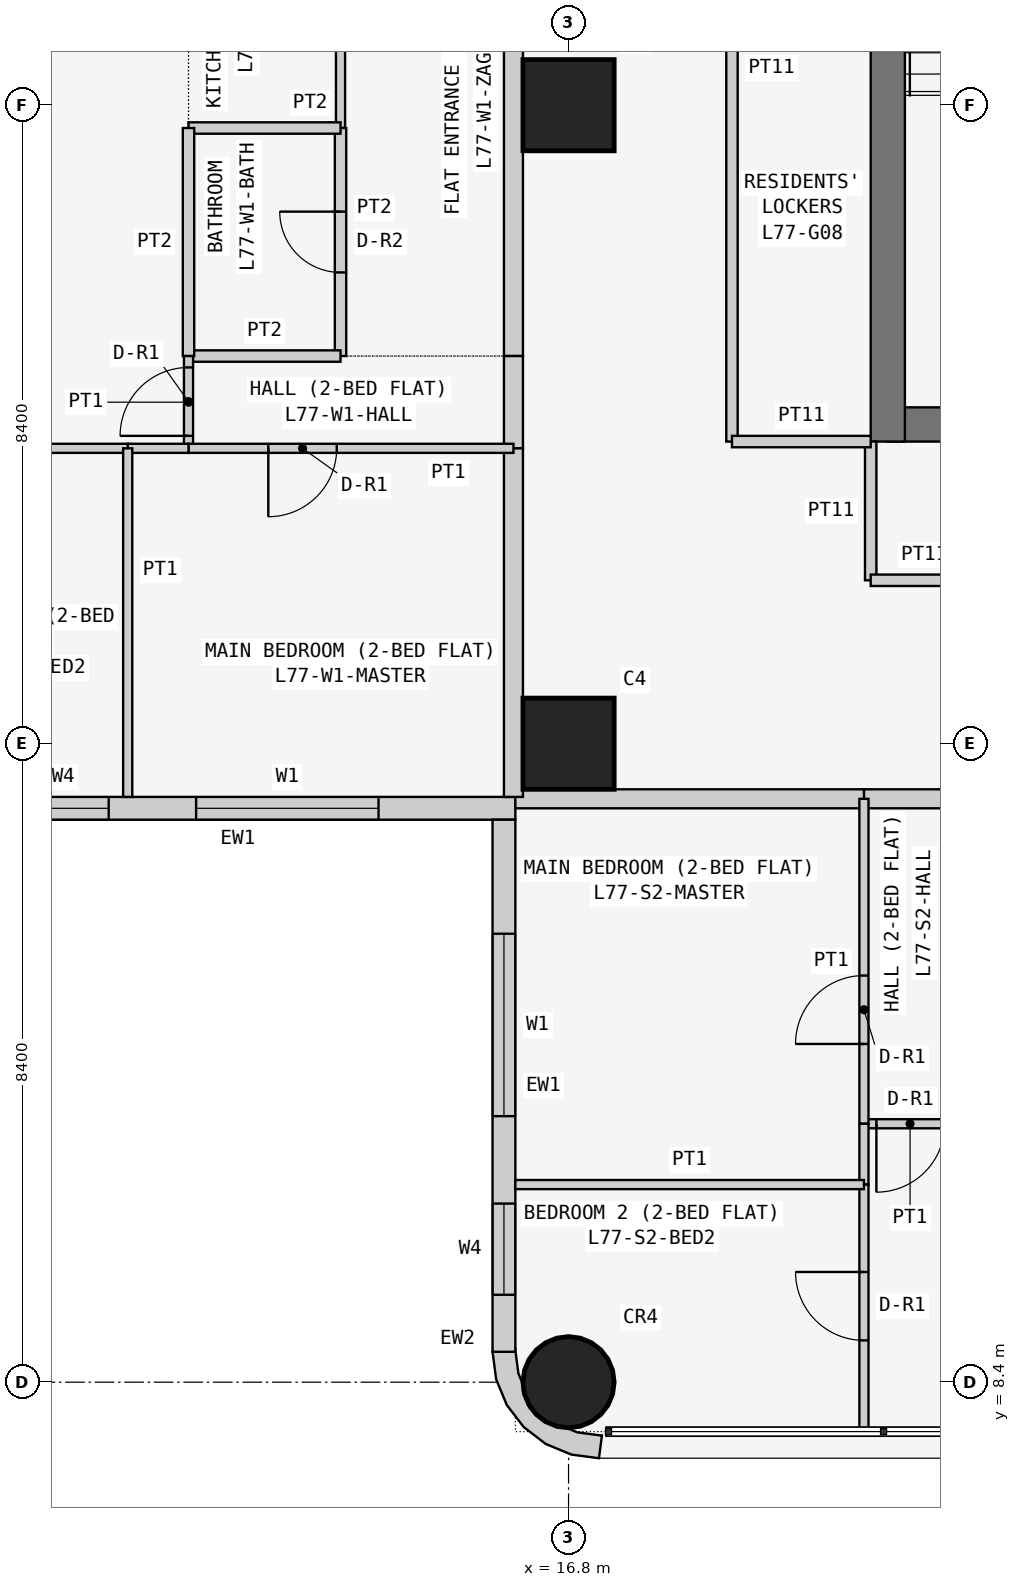
"""IFC4 building model, lengths in metres.
Left out: names, types, materials, properties, quantities, classifications, styles, units other than length and angle.
Written with IfcOpenShell. Run it as: python <this file> out.ifc"""

import sys

from ifc_helpers import new_model, si_unit, direction, frame, frame_2d, origin, origin_2d, place, context, subcontext, project, spatial, polyline, rectangle, circle, outline, extrude, element, fill, save


model = new_model("IFC4")
c1 = context("Model", 3, precision=1e-05, world=origin(), true_north=direction((0.0, 1.0)))
c2 = subcontext(c1, "Body", "Model", "MODEL_VIEW")
j1 = project(units=[si_unit("LENGTHUNIT", "METRE"), si_unit("PLANEANGLEUNIT", "RADIAN")], contexts=[c1])
p1 = place(None, origin())
s1 = spatial("IfcSite", under=j1, at=p1, CompositionType="ELEMENT")
p2 = place(p1, origin())
s2 = spatial("IfcBuilding", under=s1, at=p2, CompositionType="ELEMENT")
p3 = place(p2, frame((0.0, 0.0, 293.7)))
s3 = spatial("IfcBuildingStorey", under=s2, at=p3, CompositionType="ELEMENT", Elevation=293.7)
p4 = place(p3, frame((16.8, 8.4, 0.0), z_axis=(0.0, 0.0, 1.0), x_axis=(1.0, 0.0, 0.0)))
e1 = element("IfcColumn", 1, at=p4, inside=s3, PredefinedType="COLUMN", context=c2, shape_type="SweptSolid", body=[
    extrude(circle(Radius=0.6, at=origin_2d()), origin(), (0.0, 0.0, 1.0), 3.6),
])
for number, where, z_axis, x_axis in (
    (2, (16.8, 16.8, 0.0), (0.0, 0.0, 1.0), (1.0, 0.0, 0.0)),
    (3, (16.8, 25.2, 0.0), (0.0, 0.0, 1.0), (1.0, 0.0, 0.0)),
):
    element("IfcColumn", number, at=place(p3, frame(where, z_axis=z_axis, x_axis=x_axis)), inside=s3, PredefinedType="COLUMN", context=c2, shape_type="SweptSolid", body=[
        extrude(rectangle(XDim=1.2, YDim=1.2, at=origin_2d()), origin(), (0.0, 0.0, 1.0), 3.6),
    ])
p5 = place(p3, frame((21.0, 21.0, 0.0), z_axis=(0.0, 0.0, 1.0), x_axis=(1.0, 0.0, 0.0)))
e4 = element("IfcWall", 4, at=p5, inside=s3, PredefinedType="SHEAR", context=c2, shape_type="SweptSolid", body=[
    extrude(rectangle(XDim=17.025, YDim=0.45, at=frame_2d((8.512, 0.0))), origin(), (0.0, 0.0, 1.0), 3.6),
])
p6 = place(p3, frame((21.0, 37.8, 0.0), z_axis=(0.0, 0.0, 1.0), x_axis=(0.0, -1.0, 0.0)))
e5 = element("IfcWall", 5, at=p6, inside=s3, PredefinedType="SHEAR", context=c2, shape_type="SweptSolid", body=[
    extrude(rectangle(XDim=17.025, YDim=0.45, at=frame_2d((8.513, 0.0))), origin(), (0.0, 0.0, 1.0), 3.6),
])
p7 = place(p6, frame((5.4, 0.0, 0.0)))
e6 = element("IfcOpeningElement", 6, at=p7, cuts=e5, PredefinedType="OPENING", context=c2, shape_type="SweptSolid", body=[
    extrude(rectangle(XDim=1.2, YDim=2.1, at=frame_2d((0.6, 1.05))), frame((0.0, 0.235, 0.0), z_axis=(0.0, -1.0, 0.0), x_axis=(1.0, 0.0, 0.0)), (0.0, 0.0, 1.0), 0.47),
])
p8 = place(p3, frame((8.8, 15.95, 0.0), z_axis=(0.0, 0.0, 1.0), x_axis=(1.0, 0.0, 0.0)))
e7 = element("IfcWall", 7, at=p8, inside=s3, PredefinedType="SOLIDWALL", context=c2, shape_type="SweptSolid", body=[
    extrude(rectangle(XDim=7.3, YDim=0.3, at=frame_2d((3.65, 0.0))), origin(), (0.0, 0.0, 1.0), 3.45),
])
p9 = place(p8, frame((3.1, 0.0, 0.9)))
e8 = element("IfcOpeningElement", 8, at=p9, cuts=e7, PredefinedType="OPENING", context=c2, shape_type="SweptSolid", body=[
    extrude(rectangle(XDim=2.4, YDim=1.5, at=frame_2d((1.2, 0.75))), frame((0.0, 0.16, 0.0), z_axis=(0.0, -1.0, 0.0), x_axis=(1.0, 0.0, 0.0)), (0.0, 0.0, 1.0), 0.32),
])
p10 = place(p8, frame((0.75, 0.0, 0.9)))
e9 = element("IfcOpeningElement", 9, at=p10, cuts=e7, PredefinedType="OPENING", context=c2, shape_type="SweptSolid", body=[
    extrude(rectangle(XDim=1.2, YDim=1.5, at=frame_2d((0.6, 0.75))), frame((0.0, 0.16, 0.0), z_axis=(0.0, -1.0, 0.0), x_axis=(1.0, 0.0, 0.0)), (0.0, 0.0, 1.0), 0.32),
])
p11 = place(p3, frame((15.95, 15.8, 0.0), z_axis=(0.0, 0.0, 1.0), x_axis=(0.0, -1.0, 0.0)))
e10 = element("IfcWall", 10, at=p11, inside=s3, PredefinedType="SOLIDWALL", context=c2, shape_type="SweptSolid", body=[
    extrude(rectangle(XDim=7.0, YDim=0.3, at=frame_2d((3.5, 0.0))), origin(), (0.0, 0.0, 1.0), 3.45),
])
p12 = place(p11, frame((1.5, 0.0, 0.9)))
e11 = element("IfcOpeningElement", 11, at=p12, cuts=e10, PredefinedType="OPENING", context=c2, shape_type="SweptSolid", body=[
    extrude(rectangle(XDim=2.4, YDim=1.5, at=frame_2d((1.2, 0.75))), frame((0.0, 0.16, 0.0), z_axis=(0.0, -1.0, 0.0), x_axis=(1.0, 0.0, 0.0)), (0.0, 0.0, 1.0), 0.32),
])
p13 = place(p11, frame((5.05, 0.0, 0.9)))
e12 = element("IfcOpeningElement", 12, at=p13, cuts=e10, PredefinedType="OPENING", context=c2, shape_type="SweptSolid", body=[
    extrude(rectangle(XDim=1.2, YDim=1.5, at=frame_2d((0.6, 0.75))), frame((0.0, 0.16, 0.0), z_axis=(0.0, -1.0, 0.0), x_axis=(1.0, 0.0, 0.0)), (0.0, 0.0, 1.0), 0.32),
])
p14 = place(p3, frame((16.224, 8.762, 0.0), z_axis=(0.0, 0.0, 1.0), x_axis=(-0.707106781187, -0.707106781187, 0.0)))
e13 = element("IfcWall", 13, at=p14, inside=s3, PredefinedType="SOLIDWALL", context=c2, shape_type="SweptSolid", body=[
    extrude(outline(polyline([(0.033, 1.469), (0.047, 1.455), (0.233, 1.212), (0.292, 1.069), (0.358, 1.003), (0.449, 0.783), (0.449, 0.543), (0.358, 0.322), (0.292, 0.257), (0.233, 0.114), (0.047, -0.129), (0.033, -0.143), (0.273, -0.327), (0.495, -0.037), (0.635, 0.3), (0.683, 0.663), (0.635, 1.025), (0.495, 1.363), (0.273, 1.653), (0.033, 1.469)])), origin(), (0.0, 0.0, 1.0), 3.45),
])
p15 = place(p3, frame((20.775, 20.775, 0.0), z_axis=(0.0, 0.0, 1.0), x_axis=(0.0, -1.0, 0.0)))
e14 = element("IfcWall", 14, at=p15, inside=s3, PredefinedType="PARTITIONING", context=c2, shape_type="SweptSolid", body=[
    extrude(rectangle(XDim=1.825, YDim=0.15, at=frame_2d((0.913, 0.0))), origin(), (0.0, 0.0, 1.0), 3.45),
])
p16 = place(p3, frame((20.775, 18.95, 0.0), z_axis=(0.0, 0.0, 1.0), x_axis=(1.0, 0.0, 0.0)))
e15 = element("IfcWall", 15, at=p16, inside=s3, PredefinedType="PARTITIONING", context=c2, shape_type="SweptSolid", body=[
    extrude(rectangle(XDim=3.525, YDim=0.15, at=frame_2d((1.763, 0.0))), origin(), (0.0, 0.0, 1.0), 3.45),
])
p17 = place(p16, frame((1.262, 0.0, 0.0)))
e16 = element("IfcOpeningElement", 16, at=p17, cuts=e15, PredefinedType="OPENING", context=c2, shape_type="SweptSolid", body=[
    extrude(rectangle(XDim=1.0, YDim=2.1, at=frame_2d((0.5, 1.05))), frame((0.0, 0.085, 0.0), z_axis=(0.0, -1.0, 0.0), x_axis=(1.0, 0.0, 0.0)), (0.0, 0.0, 1.0), 0.17),
])
p18 = place(p3, frame((18.95, 30.6, 0.0), z_axis=(0.0, 0.0, 1.0), x_axis=(0.0, -1.0, 0.0)))
e17 = element("IfcWall", 17, at=p18, inside=s3, PredefinedType="PARTITIONING", context=c2, shape_type="SweptSolid", body=[
    extrude(rectangle(XDim=9.825, YDim=0.15, at=frame_2d((4.913, 0.0))), origin(), (0.0, 0.0, 1.0), 3.45),
])
p19 = place(p18, frame((1.75, 0.0, 0.0)))
e18 = element("IfcOpeningElement", 18, at=p19, cuts=e17, PredefinedType="OPENING", context=c2, shape_type="SweptSolid", body=[
    extrude(rectangle(XDim=1.0, YDim=2.1, at=frame_2d((0.5, 1.05))), frame((0.0, 0.085, 0.0), z_axis=(0.0, -1.0, 0.0), x_axis=(1.0, 0.0, 0.0)), (0.0, 0.0, 1.0), 0.17),
])
p20 = place(p3, frame((18.95, 20.775, 0.0), z_axis=(0.0, 0.0, 1.0), x_axis=(1.0, 0.0, 0.0)))
e19 = element("IfcWall", 19, at=p20, inside=s3, PredefinedType="PARTITIONING", context=c2, shape_type="SweptSolid", body=[
    extrude(rectangle(XDim=1.825, YDim=0.15, at=frame_2d((0.913, 0.0))), origin(), (0.0, 0.0, 1.0), 3.45),
])
p21 = place(p3, frame((21.9, 16.075, 0.0), z_axis=(0.0, 0.0, 1.0), x_axis=(-1.0, 0.0, 0.0)))
e20 = element("IfcWall", 20, at=p21, inside=s3, PredefinedType="PARTITIONING", context=c2, shape_type="SweptSolid", body=[
    extrude(rectangle(XDim=1.214, YDim=0.25, at=frame_2d((0.607, 0.0))), origin(), (0.0, 0.0, 1.0), 3.45),
])
p22 = place(p3, frame((20.686, 16.075, 0.0), z_axis=(0.0, 0.0, 1.0), x_axis=(-1.0, 0.0, 0.0)))
e21 = element("IfcWall", 21, at=p22, inside=s3, PredefinedType="PARTITIONING", context=c2, shape_type="SweptSolid", body=[
    extrude(rectangle(XDim=4.586, YDim=0.25, at=frame_2d((2.293, 0.0))), origin(), (0.0, 0.0, 1.0), 3.45),
])
p23 = place(p3, frame((16.075, 21.9, 0.0), z_axis=(0.0, 0.0, 1.0), x_axis=(0.0, 1.0, 0.0)))
e22 = element("IfcWall", 22, at=p23, inside=s3, PredefinedType="PARTITIONING", context=c2, shape_type="SweptSolid", body=[
    extrude(rectangle(XDim=7.5, YDim=0.25, at=frame_2d((3.75, 0.0))), origin(), (0.0, 0.0, 1.0), 3.45),
])
p24 = place(p23, frame((5.7, 0.0, 0.0)))
e23 = element("IfcOpeningElement", 23, at=p24, cuts=e22, PredefinedType="OPENING", context=c2, shape_type="SweptSolid", body=[
    extrude(rectangle(XDim=1.0, YDim=2.1, at=frame_2d((0.5, 1.05))), frame((0.0, 0.135, 0.0), z_axis=(0.0, -1.0, 0.0), x_axis=(1.0, 0.0, 0.0)), (0.0, 0.0, 1.0), 0.27),
])
p25 = place(p3, frame((16.075, 20.686, 0.0), z_axis=(0.0, 0.0, 1.0), x_axis=(0.0, 1.0, 0.0)))
e24 = element("IfcWall", 24, at=p25, inside=s3, PredefinedType="PARTITIONING", context=c2, shape_type="SweptSolid", body=[
    extrude(rectangle(XDim=1.214, YDim=0.25, at=frame_2d((0.607, 0.0))), origin(), (0.0, 0.0, 1.0), 3.45),
])
p26 = place(p3, frame((16.075, 16.1, 0.0), z_axis=(0.0, 0.0, 1.0), x_axis=(0.0, 1.0, 0.0)))
e25 = element("IfcWall", 25, at=p26, inside=s3, PredefinedType="PARTITIONING", context=c2, shape_type="SweptSolid", body=[
    extrude(rectangle(XDim=4.586, YDim=0.25, at=frame_2d((2.293, 0.0))), origin(), (0.0, 0.0, 1.0), 3.45),
])
p27 = place(p3, frame((21.9, 11.8, 0.0), z_axis=(0.0, 0.0, 1.0), x_axis=(-1.0, 0.0, 0.0)))
e26 = element("IfcWall", 26, at=p27, inside=s3, PredefinedType="PARTITIONING", context=c2, shape_type="SweptSolid", body=[
    extrude(rectangle(XDim=1.214, YDim=0.12, at=frame_2d((0.607, 0.0))), origin(), (0.0, 0.0, 1.0), 3.45),
])
p28 = place(p27, frame((0.15, 0.0, 0.0)))
e27 = element("IfcOpeningElement", 27, at=p28, cuts=e26, PredefinedType="OPENING", context=c2, shape_type="SweptSolid", body=[
    extrude(rectangle(XDim=0.9, YDim=2.1, at=frame_2d((0.45, 1.05))), frame((0.0, 0.07, 0.0), z_axis=(0.0, -1.0, 0.0), x_axis=(1.0, 0.0, 0.0)), (0.0, 0.0, 1.0), 0.14),
])
p29 = place(p3, frame((20.686, 11.8, 0.0), z_axis=(0.0, 0.0, 1.0), x_axis=(0.0, 1.0, 0.0)))
e28 = element("IfcWall", 28, at=p29, inside=s3, PredefinedType="PARTITIONING", context=c2, shape_type="SweptSolid", body=[
    extrude(rectangle(XDim=4.275, YDim=0.12, at=frame_2d((2.137, 0.0))), origin(), (0.0, 0.0, 1.0), 3.45),
])
p30 = place(p29, frame((1.05, 0.0, 0.0)))
e29 = element("IfcOpeningElement", 29, at=p30, cuts=e28, PredefinedType="OPENING", context=c2, shape_type="SweptSolid", body=[
    extrude(rectangle(XDim=0.9, YDim=2.1, at=frame_2d((0.45, 1.05))), frame((0.0, 0.07, 0.0), z_axis=(0.0, -1.0, 0.0), x_axis=(1.0, 0.0, 0.0)), (0.0, 0.0, 1.0), 0.14),
])
p31 = place(p3, frame((20.686, 11.0, 0.0), z_axis=(0.0, 0.0, 1.0), x_axis=(0.0, 1.0, 0.0)))
e30 = element("IfcWall", 30, at=p31, inside=s3, PredefinedType="PARTITIONING", context=c2, shape_type="SweptSolid", body=[
    extrude(rectangle(XDim=0.8, YDim=0.12, at=frame_2d((0.4, 0.0))), origin(), (0.0, 0.0, 1.0), 3.45),
])
p32 = place(p3, frame((20.686, 7.75, 0.0), z_axis=(0.0, 0.0, 1.0), x_axis=(0.0, 1.0, 0.0)))
e31 = element("IfcWall", 31, at=p32, inside=s3, PredefinedType="PARTITIONING", context=c2, shape_type="SweptSolid", body=[
    extrude(rectangle(XDim=3.25, YDim=0.12, at=frame_2d((1.625, 0.0))), origin(), (0.0, 0.0, 1.0), 3.45),
])
p33 = place(p32, frame((1.2, 0.0, 0.0)))
e32 = element("IfcOpeningElement", 32, at=p33, cuts=e31, PredefinedType="OPENING", context=c2, shape_type="SweptSolid", body=[
    extrude(rectangle(XDim=0.9, YDim=2.1, at=frame_2d((0.45, 1.05))), frame((0.0, 0.07, 0.0), z_axis=(0.0, -1.0, 0.0), x_axis=(1.0, 0.0, 0.0)), (0.0, 0.0, 1.0), 0.14),
])
p34 = place(p3, frame((20.686, 11.0, 0.0), z_axis=(0.0, 0.0, 1.0), x_axis=(-1.0, 0.0, 0.0)))
e33 = element("IfcWall", 33, at=p34, inside=s3, PredefinedType="PARTITIONING", context=c2, shape_type="SweptSolid", body=[
    extrude(rectangle(XDim=4.586, YDim=0.12, at=frame_2d((2.293, 0.0))), origin(), (0.0, 0.0, 1.0), 3.45),
])
p35 = place(p3, frame((13.8, 29.4, 0.0), z_axis=(0.0, 0.0, 1.0), x_axis=(0.0, -1.0, 0.0)))
e34 = element("IfcWall", 34, at=p35, inside=s3, PredefinedType="PARTITIONING", context=c2, shape_type="SweptSolid", body=[
    extrude(rectangle(XDim=4.5, YDim=0.12, at=frame_2d((2.25, 0.0))), origin(), (0.0, 0.0, 1.0), 3.45),
])
p36 = place(p35, frame((1.55, 0.0, 0.0)))
e35 = element("IfcOpeningElement", 35, at=p36, cuts=e34, PredefinedType="OPENING", context=c2, shape_type="SweptSolid", body=[
    extrude(rectangle(XDim=0.9, YDim=2.1, at=frame_2d((0.45, 1.05))), frame((0.0, 0.07, 0.0), z_axis=(0.0, -1.0, 0.0), x_axis=(1.0, 0.0, 0.0)), (0.0, 0.0, 1.0), 0.14),
])
p37 = place(p3, frame((13.8, 24.9, 0.0), z_axis=(0.0, 0.0, 1.0), x_axis=(0.0, -1.0, 0.0)))
e36 = element("IfcWall", 36, at=p37, inside=s3, PredefinedType="PARTITIONING", context=c2, shape_type="SweptSolid", body=[
    extrude(rectangle(XDim=3.0, YDim=0.15, at=frame_2d((1.5, 0.0))), origin(), (0.0, 0.0, 1.0), 3.45),
])
p38 = place(p37, frame((1.1, 0.0, 0.0)))
e37 = element("IfcOpeningElement", 37, at=p38, cuts=e36, PredefinedType="OPENING", context=c2, shape_type="SweptSolid", body=[
    extrude(rectangle(XDim=0.8, YDim=2.1, at=frame_2d((0.4, 1.05))), frame((0.0, 0.085, 0.0), z_axis=(0.0, -1.0, 0.0), x_axis=(1.0, 0.0, 0.0)), (0.0, 0.0, 1.0), 0.17),
])
for number, where, z_axis, x_axis in (
    (38, (11.8, 24.9, 0.0), (0.0, 0.0, 1.0), (1.0, 0.0, 0.0)),
    (39, (11.8, 21.9, 0.0), (0.0, 0.0, 1.0), (1.0, 0.0, 0.0)),
):
    element("IfcWall", number, at=place(p3, frame(where, z_axis=z_axis, x_axis=x_axis)), inside=s3, PredefinedType="PARTITIONING", context=c2, shape_type="SweptSolid", body=[
        extrude(rectangle(XDim=2.0, YDim=0.15, at=frame_2d((1.0, 0.0))), origin(), (0.0, 0.0, 1.0), 3.45),
    ])
p39 = place(p3, frame((11.8, 24.9, 0.0), z_axis=(0.0, 0.0, 1.0), x_axis=(0.0, -1.0, 0.0)))
e40 = element("IfcWall", 40, at=p39, inside=s3, PredefinedType="PARTITIONING", context=c2, shape_type="SweptSolid", body=[
    extrude(rectangle(XDim=3.0, YDim=0.15, at=frame_2d((1.5, 0.0))), origin(), (0.0, 0.0, 1.0), 3.45),
])
p40 = place(p3, frame((11.8, 21.9, 0.0), z_axis=(0.0, 0.0, 1.0), x_axis=(0.0, -1.0, 0.0)))
e41 = element("IfcWall", 41, at=p40, inside=s3, PredefinedType="PARTITIONING", context=c2, shape_type="SweptSolid", body=[
    extrude(rectangle(XDim=1.214, YDim=0.12, at=frame_2d((0.607, 0.0))), origin(), (0.0, 0.0, 1.0), 3.45),
])
p41 = place(p40, frame((0.15, 0.0, 0.0)))
e42 = element("IfcOpeningElement", 42, at=p41, cuts=e41, PredefinedType="OPENING", context=c2, shape_type="SweptSolid", body=[
    extrude(rectangle(XDim=0.9, YDim=2.1, at=frame_2d((0.45, 1.05))), frame((0.0, 0.07, 0.0), z_axis=(0.0, -1.0, 0.0), x_axis=(1.0, 0.0, 0.0)), (0.0, 0.0, 1.0), 0.14),
])
p42 = place(p3, frame((11.8, 20.686, 0.0), z_axis=(0.0, 0.0, 1.0), x_axis=(1.0, 0.0, 0.0)))
e43 = element("IfcWall", 43, at=p42, inside=s3, PredefinedType="PARTITIONING", context=c2, shape_type="SweptSolid", body=[
    extrude(rectangle(XDim=4.275, YDim=0.12, at=frame_2d((2.137, 0.0))), origin(), (0.0, 0.0, 1.0), 3.45),
])
p43 = place(p42, frame((1.05, 0.0, 0.0)))
e44 = element("IfcOpeningElement", 44, at=p43, cuts=e43, PredefinedType="OPENING", context=c2, shape_type="SweptSolid", body=[
    extrude(rectangle(XDim=0.9, YDim=2.1, at=frame_2d((0.45, 1.05))), frame((0.0, 0.07, 0.0), z_axis=(0.0, -1.0, 0.0), x_axis=(1.0, 0.0, 0.0)), (0.0, 0.0, 1.0), 0.14),
])
p44 = place(p3, frame((11.0, 20.686, 0.0), z_axis=(0.0, 0.0, 1.0), x_axis=(1.0, 0.0, 0.0)))
e45 = element("IfcWall", 45, at=p44, inside=s3, PredefinedType="PARTITIONING", context=c2, shape_type="SweptSolid", body=[
    extrude(rectangle(XDim=0.8, YDim=0.12, at=frame_2d((0.4, 0.0))), origin(), (0.0, 0.0, 1.0), 3.45),
])
p45 = place(p3, frame((7.75, 20.686, 0.0), z_axis=(0.0, 0.0, 1.0), x_axis=(1.0, 0.0, 0.0)))
e46 = element("IfcWall", 46, at=p45, inside=s3, PredefinedType="PARTITIONING", context=c2, shape_type="SweptSolid", body=[
    extrude(rectangle(XDim=3.25, YDim=0.12, at=frame_2d((1.625, 0.0))), origin(), (0.0, 0.0, 1.0), 3.45),
])
p46 = place(p45, frame((1.2, 0.0, 0.0)))
e47 = element("IfcOpeningElement", 47, at=p46, cuts=e46, PredefinedType="OPENING", context=c2, shape_type="SweptSolid", body=[
    extrude(rectangle(XDim=0.9, YDim=2.1, at=frame_2d((0.45, 1.05))), frame((0.0, 0.07, 0.0), z_axis=(0.0, -1.0, 0.0), x_axis=(1.0, 0.0, 0.0)), (0.0, 0.0, 1.0), 0.14),
])
p47 = place(p3, frame((11.0, 20.686, 0.0), z_axis=(0.0, 0.0, 1.0), x_axis=(0.0, -1.0, 0.0)))
e48 = element("IfcWall", 48, at=p47, inside=s3, PredefinedType="PARTITIONING", context=c2, shape_type="SweptSolid", body=[
    extrude(rectangle(XDim=4.586, YDim=0.12, at=frame_2d((2.293, 0.0))), origin(), (0.0, 0.0, 1.0), 3.45),
])
p48 = place(p12, origin())
e49 = element("IfcWindow", 49, at=p48, inside=s3, PartitioningType="SINGLE_PANEL", PredefinedType="WINDOW", context=c2, shape_type="SweptSolid", body=[
    extrude(rectangle(XDim=2.4, YDim=1.5, at=frame_2d((1.2, 0.75))), frame((0.0, 0.03, 0.0), z_axis=(0.0, -1.0, 0.0), x_axis=(1.0, 0.0, 0.0)), (0.0, 0.0, 1.0), 0.06),
])
fill(e11, e49)
p49 = place(p13, origin())
e50 = element("IfcWindow", 50, at=p49, inside=s3, PartitioningType="SINGLE_PANEL", PredefinedType="WINDOW", context=c2, shape_type="SweptSolid", body=[
    extrude(rectangle(XDim=1.2, YDim=1.5, at=frame_2d((0.6, 0.75))), frame((0.0, 0.03, 0.0), z_axis=(0.0, -1.0, 0.0), x_axis=(1.0, 0.0, 0.0)), (0.0, 0.0, 1.0), 0.06),
])
fill(e12, e50)
p50 = place(p9, origin())
e51 = element("IfcWindow", 51, at=p50, inside=s3, PartitioningType="SINGLE_PANEL", PredefinedType="WINDOW", context=c2, shape_type="SweptSolid", body=[
    extrude(rectangle(XDim=2.4, YDim=1.5, at=frame_2d((1.2, 0.75))), frame((0.0, 0.03, 0.0), z_axis=(0.0, -1.0, 0.0), x_axis=(1.0, 0.0, 0.0)), (0.0, 0.0, 1.0), 0.06),
])
fill(e8, e51)
p51 = place(p10, origin())
e52 = element("IfcWindow", 52, at=p51, inside=s3, PartitioningType="SINGLE_PANEL", PredefinedType="WINDOW", context=c2, shape_type="SweptSolid", body=[
    extrude(rectangle(XDim=1.2, YDim=1.5, at=frame_2d((0.6, 0.75))), frame((0.0, 0.03, 0.0), z_axis=(0.0, -1.0, 0.0), x_axis=(1.0, 0.0, 0.0)), (0.0, 0.0, 1.0), 0.06),
])
fill(e9, e52)
p52 = place(p28, origin())
e53 = element("IfcDoor", 53, at=p52, inside=s3, OperationType="SINGLE_SWING_RIGHT", PredefinedType="DOOR", context=c2, shape_type="SweptSolid", body=[
    extrude(rectangle(XDim=0.9, YDim=2.1, at=frame_2d((0.45, 1.05))), frame((0.0, 0.025, 0.0), z_axis=(0.0, -1.0, 0.0), x_axis=(1.0, 0.0, 0.0)), (0.0, 0.0, 1.0), 0.05),
])
fill(e27, e53)
p53 = place(p30, origin())
e54 = element("IfcDoor", 54, at=p53, inside=s3, OperationType="SINGLE_SWING_LEFT", PredefinedType="DOOR", context=c2, shape_type="SweptSolid", body=[
    extrude(rectangle(XDim=0.9, YDim=2.1, at=frame_2d((0.45, 1.05))), frame((0.0, 0.025, 0.0), z_axis=(0.0, -1.0, 0.0), x_axis=(1.0, 0.0, 0.0)), (0.0, 0.0, 1.0), 0.05),
])
fill(e29, e54)
p54 = place(p33, origin())
e55 = element("IfcDoor", 55, at=p54, inside=s3, OperationType="SINGLE_SWING_RIGHT", PredefinedType="DOOR", context=c2, shape_type="SweptSolid", body=[
    extrude(rectangle(XDim=0.9, YDim=2.1, at=frame_2d((0.45, 1.05))), frame((0.0, 0.025, 0.0), z_axis=(0.0, -1.0, 0.0), x_axis=(1.0, 0.0, 0.0)), (0.0, 0.0, 1.0), 0.05),
])
fill(e32, e55)
p55 = place(p38, frame((0.8, 0.0, 0.0), z_axis=(0.0, 0.0, 1.0), x_axis=(-1.0, 0.0, 0.0)))
e56 = element("IfcDoor", 56, at=p55, inside=s3, OperationType="SINGLE_SWING_RIGHT", PredefinedType="DOOR", context=c2, shape_type="SweptSolid", body=[
    extrude(rectangle(XDim=0.8, YDim=2.1, at=frame_2d((0.4, 1.05))), frame((0.0, 0.025, 0.0), z_axis=(0.0, -1.0, 0.0), x_axis=(1.0, 0.0, 0.0)), (0.0, 0.0, 1.0), 0.05),
])
fill(e37, e56)
p56 = place(p41, frame((0.9, 0.0, 0.0), z_axis=(0.0, 0.0, 1.0), x_axis=(-1.0, 0.0, 0.0)))
e57 = element("IfcDoor", 57, at=p56, inside=s3, OperationType="SINGLE_SWING_LEFT", PredefinedType="DOOR", context=c2, shape_type="SweptSolid", body=[
    extrude(rectangle(XDim=0.9, YDim=2.1, at=frame_2d((0.45, 1.05))), frame((0.0, 0.025, 0.0), z_axis=(0.0, -1.0, 0.0), x_axis=(1.0, 0.0, 0.0)), (0.0, 0.0, 1.0), 0.05),
])
fill(e42, e57)
p57 = place(p43, frame((0.9, 0.0, 0.0), z_axis=(0.0, 0.0, 1.0), x_axis=(-1.0, 0.0, 0.0)))
e58 = element("IfcDoor", 58, at=p57, inside=s3, OperationType="SINGLE_SWING_RIGHT", PredefinedType="DOOR", context=c2, shape_type="SweptSolid", body=[
    extrude(rectangle(XDim=0.9, YDim=2.1, at=frame_2d((0.45, 1.05))), frame((0.0, 0.025, 0.0), z_axis=(0.0, -1.0, 0.0), x_axis=(1.0, 0.0, 0.0)), (0.0, 0.0, 1.0), 0.05),
])
fill(e44, e58)
save(model, sys.argv[1])
